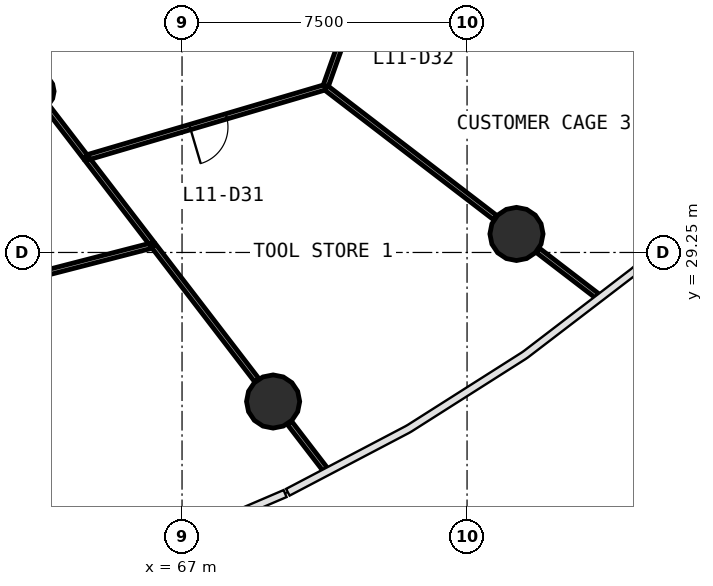
"""IFC4 building model, lengths in metres.
Left out: names, types, materials, properties, quantities, classifications, styles, units other than length and angle.
Written with IfcOpenShell. Run it as: python <this file> out.ifc"""

import sys

from ifc_helpers import new_model, si_unit, direction, frame, frame_2d, origin, origin_2d, place, context, subcontext, project, spatial, rectangle, circle, extrude, source, transform, mapped, element, fill, save


model = new_model("IFC4")
c1 = context("Model", 3, precision=1e-05, world=origin(), true_north=direction((0.0, 1.0)))
c2 = subcontext(c1, "Body", "Model", "MODEL_VIEW")
j1 = project(units=[si_unit("LENGTHUNIT", "METRE"), si_unit("PLANEANGLEUNIT", "RADIAN")], contexts=[c1])
p1 = place(None, origin())
s1 = spatial("IfcSite", under=j1, at=p1, CompositionType="ELEMENT")
p2 = place(p1, origin())
s2 = spatial("IfcBuilding", under=s1, at=p2, CompositionType="ELEMENT")
p3 = place(p2, frame((0.0, 0.0, 49.0)))
s3 = spatial("IfcBuildingStorey", under=s2, at=p3, CompositionType="ELEMENT", Elevation=49.0)
m1 = source(origin(), c2, "Body", "SweptSolid", [
    extrude(circle(Radius=0.7, at=origin_2d()), origin(), (0.0, 0.0, 1.0), 4.4),
])
for number, where, z_axis, x_axis in (
    (1, (69.396, 25.328, 0.0), (0.0, 0.0, 1.0), (1.0, 0.0, 0.0)),
    (2, (75.801, 29.737, 0.0), (0.0, 0.0, 1.0), (1.0, 0.0, 0.0)),
):
    element("IfcColumn", number, at=place(p3, frame(where, z_axis=z_axis, x_axis=x_axis)), inside=s3, PredefinedType="COLUMN", context=c2, shape_type="MappedRepresentation", body=[
        mapped(m1, transform((0.0, 0.0, 0.0), scale=1.0)),
    ])
m2 = source(origin(), c2, "Body", "SweptSolid", [
    extrude(circle(Radius=0.5, at=origin_2d()), origin(), (0.0, 0.0, 1.0), 4.4),
])
p4 = place(p3, frame((63.134, 33.49, 0.0), z_axis=(0.0, 0.0, 1.0), x_axis=(1.0, 0.0, 0.0)))
e3 = element("IfcColumn", 3, at=p4, inside=s3, PredefinedType="COLUMN", context=c2, shape_type="MappedRepresentation", body=[
    mapped(m2, transform((0.0, 0.0, 0.0), scale=1.0)),
])
p5 = place(p3, frame((70.769, 33.598, 0.0), z_axis=(0.0, 0.0, 1.0), x_axis=(-0.959164410747, -0.282849134974, 0.0)))
e4 = element("IfcWall", 4, at=p5, inside=s3, PredefinedType="PARTITIONING", context=c2, shape_type="SweptSolid", body=[
    extrude(rectangle(XDim=6.562, YDim=0.14, at=frame_2d((3.281, 0.0))), origin(), (0.0, 0.0, 1.0), 3.05),
])
p6 = place(p5, frame((2.712, 0.0, 0.0)))
e5 = element("IfcOpeningElement", 5, at=p6, cuts=e4, PredefinedType="OPENING", context=c2, shape_type="SweptSolid", body=[
    extrude(rectangle(XDim=1.0, YDim=2.1, at=frame_2d((0.5, 1.05))), frame((0.0, 0.08, 0.0), z_axis=(0.0, -1.0, 0.0), x_axis=(1.0, 0.0, 0.0)), (0.0, 0.0, 1.0), 0.16),
])
p7 = place(p3, frame((72.798, 39.309, 0.0), z_axis=(0.0, 0.0, 1.0), x_axis=(-0.334820387554, -0.942281968456, 0.0)))
e6 = element("IfcWall", 6, at=p7, inside=s3, PredefinedType="PARTITIONING", context=c2, shape_type="SweptSolid", body=[
    extrude(rectangle(XDim=6.031, YDim=0.14, at=frame_2d((3.016, 0.0))), origin(), (0.0, 0.0, 1.0), 3.05),
])
p8 = place(p7, frame((2.581, 0.0, 0.0)))
e7 = element("IfcOpeningElement", 7, at=p8, cuts=e6, PredefinedType="OPENING", context=c2, shape_type="SweptSolid", body=[
    extrude(rectangle(XDim=1.0, YDim=2.1, at=frame_2d((0.5, 1.05))), frame((0.0, 0.08, 0.0), z_axis=(0.0, -1.0, 0.0), x_axis=(1.0, 0.0, 0.0)), (0.0, 0.0, 1.0), 0.16),
])
p9 = place(p3, frame((60.319, 27.916, 0.0), z_axis=(0.0, 0.0, 1.0), x_axis=(0.968340865999, 0.24963166313, 0.0)))
e8 = element("IfcWall", 8, at=p9, inside=s3, PredefinedType="PARTITIONING", context=c2, shape_type="SweptSolid", body=[
    extrude(rectangle(XDim=6.115, YDim=0.14, at=frame_2d((3.057, 0.0))), origin(), (0.0, 0.0, 1.0), 3.05),
])
p10 = place(p3, frame((70.793, 33.58, 0.0), z_axis=(0.0, 0.0, 1.0), x_axis=(0.793369467151, -0.6087404115, 0.0)))
e9 = element("IfcWall", 9, at=p10, inside=s3, PredefinedType="PARTITIONING", context=c2, shape_type="SweptSolid", body=[
    extrude(rectangle(XDim=5.608, YDim=0.14, at=frame_2d((2.804, 0.0))), origin(), (0.0, 0.0, 1.0), 3.05),
])
p11 = place(p3, frame((66.258, 29.418, 0.0), z_axis=(0.0, 0.0, 1.0), x_axis=(0.608774632027, -0.793343209085, 0.0)))
e10 = element("IfcWall", 10, at=p11, inside=s3, PredefinedType="PARTITIONING", context=c2, shape_type="SweptSolid", body=[
    extrude(rectangle(XDim=4.451, YDim=0.14, at=frame_2d((2.226, 0.0))), origin(), (0.0, 0.0, 1.0), 3.05),
])
p12 = place(p3, frame((64.521, 31.683, 0.0), z_axis=(0.0, 0.0, 1.0), x_axis=(0.608761578312, -0.793353225727, 0.0)))
e11 = element("IfcWall", 11, at=p12, inside=s3, PredefinedType="PARTITIONING", context=c2, shape_type="SweptSolid", body=[
    extrude(rectangle(XDim=2.748, YDim=0.14, at=frame_2d((1.374, 0.0))), origin(), (0.0, 0.0, 1.0), 3.05),
])
p13 = place(p3, frame((76.359, 29.309, 0.0), z_axis=(0.0, 0.0, 1.0), x_axis=(0.793312100237, -0.608815170325, 0.0)))
e12 = element("IfcWall", 12, at=p13, inside=s3, PredefinedType="PARTITIONING", context=c2, shape_type="SweptSolid", body=[
    extrude(rectangle(XDim=1.977, YDim=0.14, at=frame_2d((0.989, 0.0))), origin(), (0.0, 0.0, 1.0), 3.05),
])
p14 = place(p3, frame((63.441, 33.09, 0.0), z_axis=(0.0, 0.0, 1.0), x_axis=(0.608812360851, -0.793314256317, 0.0)))
e13 = element("IfcWall", 13, at=p14, inside=s3, PredefinedType="PARTITIONING", context=c2, shape_type="SweptSolid", body=[
    extrude(rectangle(XDim=1.669, YDim=0.14, at=frame_2d((0.834, 0.0))), origin(), (0.0, 0.0, 1.0), 3.05),
])
p15 = place(p3, frame((69.825, 24.77, 0.0), z_axis=(0.0, 0.0, 1.0), x_axis=(0.608816471317, -0.793311101809, 0.0)))
e14 = element("IfcWall", 14, at=p15, inside=s3, PredefinedType="PARTITIONING", context=c2, shape_type="SweptSolid", body=[
    extrude(rectangle(XDim=1.544, YDim=0.14, at=frame_2d((0.772, 0.0))), origin(), (0.0, 0.0, 1.0), 3.05),
])
m3 = source(origin(), c2, "Body", "SweptSolid", [
    extrude(rectangle(XDim=1.0, YDim=2.1, at=frame_2d((0.5, 1.05))), frame((0.0, 0.025, 0.0), z_axis=(0.0, -1.0, 0.0), x_axis=(1.0, 0.0, 0.0)), (0.0, 0.0, 1.0), 0.05),
])
p16 = place(p6, origin())
e15 = element("IfcDoor", 15, at=p16, inside=s3, OperationType="SINGLE_SWING_RIGHT", PredefinedType="DOOR", context=c2, shape_type="MappedRepresentation", body=[
    mapped(m3, transform((0.0, 0.0, 0.0), scale=1.0)),
])
fill(e5, e15)
save(model, sys.argv[1])
